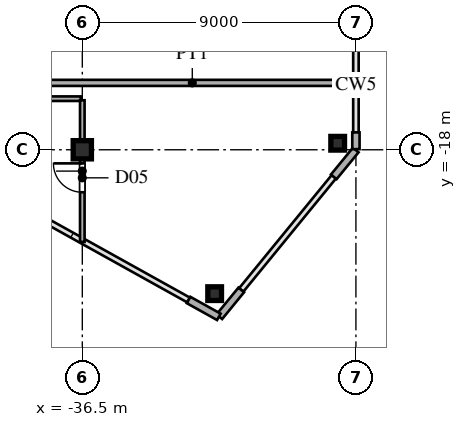
"""IFC4 building model, lengths in metres.
Left out: names, types, materials, properties, quantities, classifications, styles, units other than length and angle.
Written with IfcOpenShell. Run it as: python <this file> out.ifc"""

import sys

from ifc_helpers import new_model, si_unit, direction, frame, frame_2d, origin, origin_2d, place, context, subcontext, project, spatial, rectangle, hollow_rectangle, i_section, extrude, source, transform, mapped, element, fill, save


model = new_model("IFC4")
c1 = context("Model", 3, precision=1e-05, world=origin(), true_north=direction((0.0, 1.0)))
c2 = subcontext(c1, "Body", "Model", "MODEL_VIEW")
j1 = project(units=[si_unit("LENGTHUNIT", "METRE"), si_unit("PLANEANGLEUNIT", "RADIAN")], contexts=[c1])
p1 = place(None, origin())
s1 = spatial("IfcSite", under=j1, at=p1, CompositionType="ELEMENT")
p2 = place(p1, origin())
s2 = spatial("IfcBuilding", under=s1, at=p2, CompositionType="ELEMENT")
p3 = place(p2, frame((0.0, 0.0, 177.9)))
s3 = spatial("IfcBuildingStorey", under=s2, at=p3, CompositionType="ELEMENT", Elevation=177.9)
m1 = source(origin(), c2, "Body", "SweptSolid", [
    extrude(i_section(OverallWidth=0.6, OverallDepth=0.6, WebThickness=0.025, FlangeThickness=0.04, at=origin_2d()), origin(), (0.0, 0.0, 1.0), 3.6),
])
p4 = place(p3, frame((-36.5, -18.0, 0.0), z_axis=(0.0, 0.0, 1.0), x_axis=(1.0, 0.0, 0.0)))
e1 = element("IfcColumn", 1, at=p4, inside=s3, PredefinedType="COLUMN", context=c2, shape_type="MappedRepresentation", body=[
    mapped(m1, transform((0.0, 0.0, 0.0), scale=1.0)),
])
m2 = source(origin(), c2, "Body", "SweptSolid", [
    extrude(hollow_rectangle(XDim=0.45, YDim=0.45, WallThickness=0.018, at=origin_2d()), origin(), (0.0, 0.0, 1.0), 3.6),
])
for number, where, z_axis, x_axis in (
    (2, (-28.1, -17.786, 0.0), (0.0, 0.0, 1.0), (1.0, 0.0, 0.0)),
    (3, (-32.147, -22.732, 0.0), (0.0, 0.0, 1.0), (1.0, 0.0, 0.0)),
):
    element("IfcColumn", number, at=place(p3, frame(where, z_axis=z_axis, x_axis=x_axis)), inside=s3, PredefinedType="COLUMN", context=c2, shape_type="MappedRepresentation", body=[
        mapped(m2, transform((0.0, 0.0, 0.0), scale=1.0)),
    ])
p5 = place(p3, frame((-27.5, -17.98, 0.0), z_axis=(0.0, 0.0, 1.0), x_axis=(0.0, 1.0, 0.0)))
e4 = element("IfcWall", 4, at=p5, inside=s3, PredefinedType="SOLIDWALL", context=c2, shape_type="SweptSolid", body=[
    extrude(rectangle(XDim=0.55, YDim=0.24, at=frame_2d((0.275, 0.0))), origin(), (0.0, 0.0, 1.0), 3.38),
])
p6 = place(p3, frame((-33.005, -22.941, 0.0), z_axis=(0.0, 0.0, 1.0), x_axis=(0.87385402111, -0.486188389196, 0.0)))
e5 = element("IfcWall", 5, at=p6, inside=s3, PredefinedType="SOLIDWALL", context=c2, shape_type="SweptSolid", body=[
    extrude(rectangle(XDim=1.14, YDim=0.24, at=frame_2d((0.57, 0.0))), origin(), (0.0, 0.0, 1.0), 3.38),
])
for number, where, z_axis, x_axis in (
    (6, (-31.994, -23.492, 0.0), (0.0, 0.0, 1.0), (0.633, 0.774, 0.0)),
    (7, (-28.228, -18.89, 0.0), (0.0, 0.0, 1.0), (0.633, 0.774, 0.0)),
):
    element("IfcWall", number, at=place(p3, frame(where, z_axis=z_axis, x_axis=x_axis)), inside=s3, PredefinedType="SOLIDWALL", context=c2, shape_type="SweptSolid", body=[
        extrude(rectangle(XDim=1.14, YDim=0.24, at=frame_2d((0.57, 0.0))), origin(), (0.0, 0.0, 1.0), 3.38),
    ])
p7 = place(p3, frame((-44.943, -16.32, 0.0), z_axis=(0.0, 0.0, 1.0), x_axis=(1.0, 0.0, 0.0)))
e8 = element("IfcWall", 8, at=p7, inside=s3, PredefinedType="PARTITIONING", context=c2, shape_type="SweptSolid", body=[
    extrude(rectangle(XDim=8.393, YDim=0.15, at=frame_2d((4.197, 0.0))), origin(), (0.0, 0.0, 1.0), 3.38),
])
p8 = place(p7, frame((3.764, 0.0, 0.0)))
e9 = element("IfcOpeningElement", 9, at=p8, cuts=e8, PredefinedType="OPENING", context=c2, shape_type="SweptSolid", body=[
    extrude(rectangle(XDim=0.95, YDim=2.15, at=frame_2d((0.475, 1.075))), frame((0.0, 0.085, 0.0), z_axis=(0.0, -1.0, 0.0), x_axis=(1.0, 0.0, 0.0)), (0.0, 0.0, 1.0), 0.17),
])
p9 = place(p3, frame((-38.265, -15.8, 0.0), z_axis=(0.0, 0.0, 1.0), x_axis=(1.0, 0.0, 0.0)))
e10 = element("IfcWall", 10, at=p9, inside=s3, PredefinedType="PARTITIONING", context=c2, shape_type="SweptSolid", body=[
    extrude(rectangle(XDim=10.765, YDim=0.2, at=frame_2d((5.382, 0.0))), origin(), (0.0, 0.0, 1.0), 3.38),
])
p10 = place(p3, frame((-36.5, -21.032, 0.0), z_axis=(0.0, 0.0, 1.0), x_axis=(0.0, 1.0, 0.0)))
e11 = element("IfcWall", 11, at=p10, inside=s3, PredefinedType="PARTITIONING", context=c2, shape_type="SweptSolid", body=[
    extrude(rectangle(XDim=4.661, YDim=0.15, at=frame_2d((2.331, 0.0))), origin(), (0.0, 0.0, 1.0), 2.78),
])
p11 = place(p10, frame((1.634, 0.0, 0.0)))
e12 = element("IfcOpeningElement", 12, at=p11, cuts=e11, PredefinedType="OPENING", context=c2, shape_type="SweptSolid", body=[
    extrude(rectangle(XDim=0.95, YDim=2.15, at=frame_2d((0.475, 1.075))), frame((0.0, 0.085, 0.0), z_axis=(0.0, -1.0, 0.0), x_axis=(1.0, 0.0, 0.0)), (0.0, 0.0, 1.0), 0.17),
])
m3 = source(origin(), c2, "Body", "SweptSolid", [
    extrude(rectangle(XDim=0.95, YDim=2.15, at=frame_2d((0.475, 1.075))), frame((0.0, 0.025, 0.0), z_axis=(0.0, -1.0, 0.0), x_axis=(1.0, 0.0, 0.0)), (0.0, 0.0, 1.0), 0.05),
])
p12 = place(p11, origin())
e13 = element("IfcDoor", 13, at=p12, inside=s3, OperationType="SINGLE_SWING_RIGHT", PredefinedType="DOOR", context=c2, shape_type="MappedRepresentation", body=[
    mapped(m3, transform((0.0, 0.0, 0.0), scale=1.0)),
])
fill(e12, e13)
save(model, sys.argv[1])
